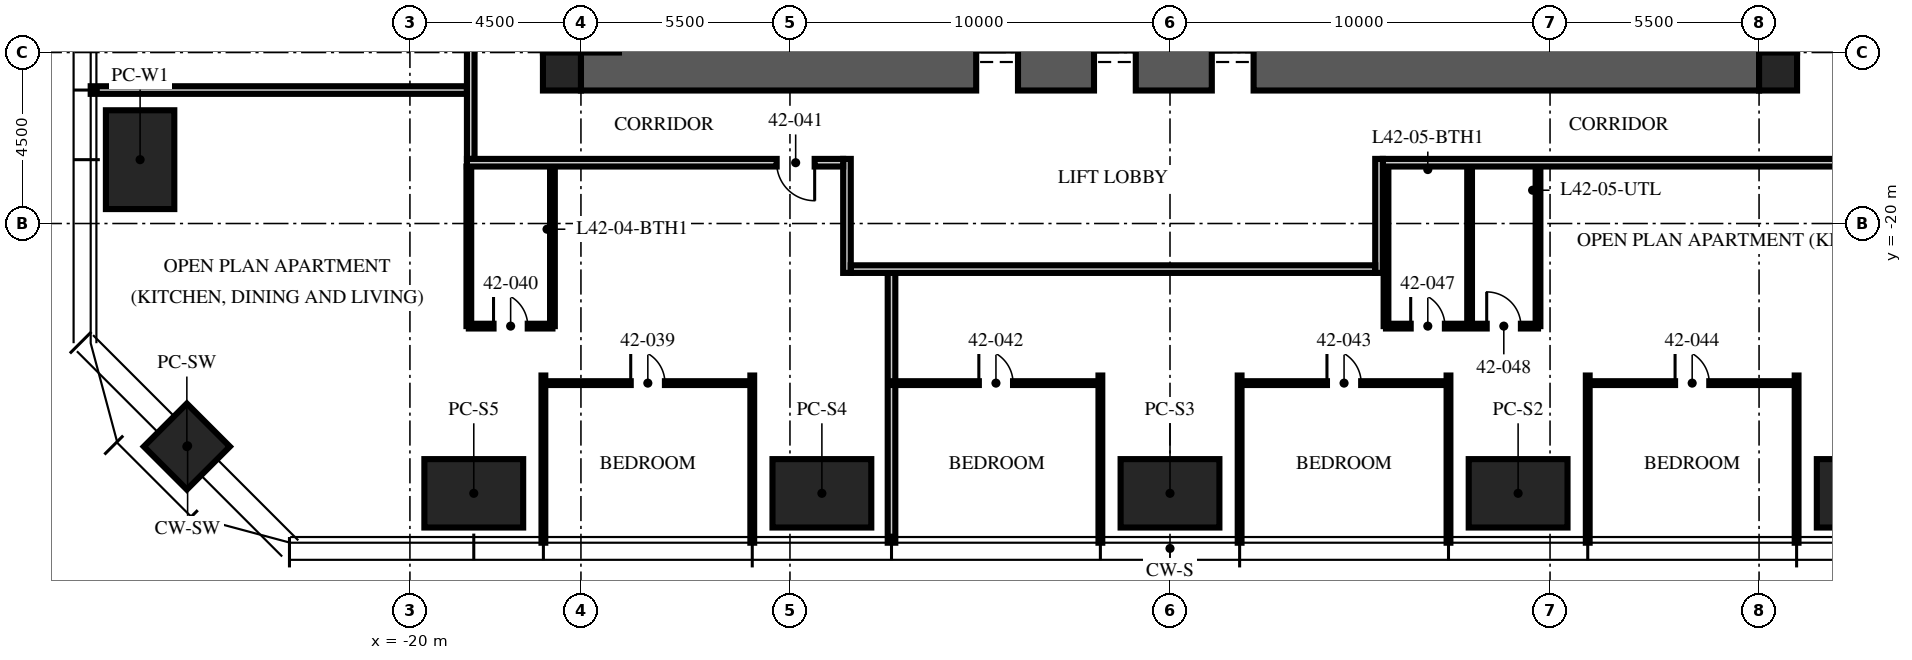
"""IFC4 building model, lengths in metres.
Left out: names, types, materials, properties, quantities, classifications, styles, units other than length and angle.
Written with IfcOpenShell. Run it as: python <this file> out.ifc"""

import sys

from ifc_helpers import new_model, si_unit, direction, frame, frame_2d, origin, origin_2d, place, context, subcontext, project, spatial, rectangle, extrude, element, fill, save


model = new_model("IFC4")
c1 = context("Model", 3, precision=1e-05, world=origin(), true_north=direction((0.0, 1.0)))
c2 = subcontext(c1, "Body", "Model", "MODEL_VIEW")
j1 = project(units=[si_unit("LENGTHUNIT", "METRE"), si_unit("PLANEANGLEUNIT", "RADIAN")], contexts=[c1])
p1 = place(None, origin())
s1 = spatial("IfcSite", under=j1, at=p1, CompositionType="ELEMENT")
p2 = place(p1, origin())
s2 = spatial("IfcBuilding", under=s1, at=p2, CompositionType="ELEMENT")
p3 = place(p2, frame((0.0, 0.0, 167.25)))
s3 = spatial("IfcBuildingStorey", under=s2, at=p3, CompositionType="ELEMENT", Elevation=167.25)
p4 = place(p3, frame((-15.5, -15.5, -0.25), z_axis=(0.0, 0.0, 1.0), x_axis=(1.0, 0.0, 0.0)))
e1 = element("IfcWall", 1, at=p4, inside=s3, PredefinedType="SHEAR", context=c2, shape_type="SweptSolid", body=[
    extrude(rectangle(XDim=31.0, YDim=2.0, at=frame_2d((15.5, 0.0))), origin(), (0.0, 0.0, 1.0), 3.75),
])
p5 = place(p4, frame((10.4, 0.0, 0.25)))
e2 = element("IfcOpeningElement", 2, at=p5, cuts=e1, PredefinedType="OPENING", context=c2, shape_type="SweptSolid", body=[
    extrude(rectangle(XDim=1.1, YDim=2.1, at=frame_2d((0.55, 1.05))), frame((0.0, 1.01, 0.0), z_axis=(0.0, -1.0, 0.0), x_axis=(1.0, 0.0, 0.0)), (0.0, 0.0, 1.0), 2.02),
])
p6 = place(p4, frame((13.5, 0.0, 0.25)))
e3 = element("IfcOpeningElement", 3, at=p6, cuts=e1, PredefinedType="OPENING", context=c2, shape_type="SweptSolid", body=[
    extrude(rectangle(XDim=1.1, YDim=2.1, at=frame_2d((0.55, 1.05))), frame((0.0, 1.01, 0.0), z_axis=(0.0, -1.0, 0.0), x_axis=(1.0, 0.0, 0.0)), (0.0, 0.0, 1.0), 2.02),
])
p7 = place(p4, frame((16.6, 0.0, 0.25)))
e4 = element("IfcOpeningElement", 4, at=p7, cuts=e1, PredefinedType="OPENING", context=c2, shape_type="SweptSolid", body=[
    extrude(rectangle(XDim=1.1, YDim=2.1, at=frame_2d((0.55, 1.05))), frame((0.0, 1.01, 0.0), z_axis=(0.0, -1.0, 0.0), x_axis=(1.0, 0.0, 0.0)), (0.0, 0.0, 1.0), 2.02),
])
for number, where, z_axis, x_axis in (
    (5, (-16.0, -16.0, -0.25), (0.0, 0.0, 1.0), (1.0, 0.0, 0.0)),
    (6, (16.0, -16.0, -0.25), (0.0, 0.0, 1.0), (1.0, 0.0, 0.0)),
):
    element("IfcColumn", number, at=place(p3, frame(where, z_axis=z_axis, x_axis=x_axis)), inside=s3, PredefinedType="COLUMN", context=c2, shape_type="SweptSolid", body=[
        extrude(rectangle(XDim=1.0, YDim=1.0, at=origin_2d()), origin(), (0.0, 0.0, 1.0), 3.75),
    ])
for number, where, z_axis, x_axis in (
    (7, (18.32, -27.1, 0.0), (0.0, 0.0, 1.0), (1.0, 0.0, 0.0)),
    (8, (9.16, -27.1, 0.0), (0.0, 0.0, 1.0), (1.0, 0.0, 0.0)),
    (9, (0.0, -27.1, 0.0), (0.0, 0.0, 1.0), (1.0, 0.0, 0.0)),
    (10, (-9.16, -27.1, 0.0), (0.0, 0.0, 1.0), (1.0, 0.0, 0.0)),
    (11, (-18.32, -27.1, 0.0), (0.0, 0.0, 1.0), (1.0, 0.0, 0.0)),
    (12, (-27.1, -18.32, 0.0), (0.0, 0.0, 1.0), (0.0, 1.0, 0.0)),
):
    element("IfcColumn", number, at=place(p3, frame(where, z_axis=z_axis, x_axis=x_axis)), inside=s3, PredefinedType="COLUMN", context=c2, shape_type="SweptSolid", body=[
        extrude(rectangle(XDim=2.6, YDim=1.8, at=origin_2d()), origin(), (0.0, 0.0, 1.0), 3.75),
    ])
p8 = place(p3, frame((-25.87, -25.87, 0.0), z_axis=(0.0, 0.0, 1.0), x_axis=(0.707106781187, -0.707106781187, 0.0)))
e13 = element("IfcColumn", 13, at=p8, inside=s3, PredefinedType="COLUMN", context=c2, shape_type="SweptSolid", body=[
    extrude(rectangle(XDim=1.6, YDim=1.6, at=origin_2d()), origin(), (0.0, 0.0, 1.0), 3.75),
])
p9 = place(p3, frame((-18.5, -16.488, 0.0), z_axis=(0.0, 0.0, 1.0), x_axis=(-1.0, 0.0, 0.0)))
e14 = element("IfcWall", 14, at=p9, inside=s3, PredefinedType="PARTITIONING", context=c2, shape_type="SweptSolid", body=[
    extrude(rectangle(XDim=9.9, YDim=0.2, at=frame_2d((4.95, 0.0))), origin(), (0.0, 0.0, 1.0), 2.81),
])
for number, where, z_axis, x_axis in (
    (15, (-16.488, -24.0, 0.0), (0.0, 0.0, 1.0), (0.0, -1.0, 0.0)),
    (16, (-10.992, -24.0, 0.0), (0.0, 0.0, 1.0), (0.0, -1.0, 0.0)),
):
    element("IfcWall", number, at=place(p3, frame(where, z_axis=z_axis, x_axis=x_axis)), inside=s3, PredefinedType="PARTITIONING", context=c2, shape_type="SweptSolid", body=[
        extrude(rectangle(XDim=4.4, YDim=0.1, at=frame_2d((2.2, 0.0))), origin(), (0.0, 0.0, 1.0), 2.81),
    ])
p10 = place(p3, frame((-7.328, -21.3, 0.0), z_axis=(0.0, 0.0, 1.0), x_axis=(0.0, -1.0, 0.0)))
e17 = element("IfcWall", 17, at=p10, inside=s3, PredefinedType="PARTITIONING", context=c2, shape_type="SweptSolid", body=[
    extrude(rectangle(XDim=7.1, YDim=0.2, at=frame_2d((3.55, 0.0))), origin(), (0.0, 0.0, 1.0), 2.81),
])
for number, where, z_axis, x_axis in (
    (18, (-1.832, -24.0, 0.0), (0.0, 0.0, 1.0), (0.0, -1.0, 0.0)),
    (19, (1.832, -24.0, 0.0), (0.0, 0.0, 1.0), (0.0, -1.0, 0.0)),
    (20, (7.328, -24.0, 0.0), (0.0, 0.0, 1.0), (0.0, -1.0, 0.0)),
    (21, (10.992, -24.0, 0.0), (0.0, 0.0, 1.0), (0.0, -1.0, 0.0)),
    (22, (16.488, -24.0, 0.0), (0.0, 0.0, 1.0), (0.0, -1.0, 0.0)),
):
    element("IfcWall", number, at=place(p3, frame(where, z_axis=z_axis, x_axis=x_axis)), inside=s3, PredefinedType="PARTITIONING", context=c2, shape_type="SweptSolid", body=[
        extrude(rectangle(XDim=4.4, YDim=0.1, at=frame_2d((2.2, 0.0))), origin(), (0.0, 0.0, 1.0), 2.81),
    ])
p11 = place(p3, frame((-16.488, -24.2, 0.0), z_axis=(0.0, 0.0, 1.0), x_axis=(1.0, 0.0, 0.0)))
e23 = element("IfcWall", 23, at=p11, inside=s3, PredefinedType="PARTITIONING", context=c2, shape_type="SweptSolid", body=[
    extrude(rectangle(XDim=5.496, YDim=0.1, at=frame_2d((2.748, 0.0))), origin(), (0.0, 0.0, 1.0), 2.81),
])
p12 = place(p11, frame((2.298, 0.0, 0.0)))
e24 = element("IfcOpeningElement", 24, at=p12, cuts=e23, PredefinedType="OPENING", context=c2, shape_type="SweptSolid", body=[
    extrude(rectangle(XDim=0.9, YDim=2.1, at=frame_2d((0.45, 1.05))), frame((0.0, 0.06, 0.0), z_axis=(0.0, -1.0, 0.0), x_axis=(1.0, 0.0, 0.0)), (0.0, 0.0, 1.0), 0.12),
])
p13 = place(p3, frame((-18.45, -22.7, 0.0), z_axis=(0.0, 0.0, 1.0), x_axis=(1.0, 0.0, 0.0)))
e25 = element("IfcWall", 25, at=p13, inside=s3, PredefinedType="PARTITIONING", context=c2, shape_type="SweptSolid", body=[
    extrude(rectangle(XDim=2.2, YDim=0.125, at=frame_2d((1.1, 0.0))), origin(), (0.0, 0.0, 1.0), 2.7),
])
p14 = place(p13, frame((0.65, 0.0, 0.0)))
e26 = element("IfcOpeningElement", 26, at=p14, cuts=e25, PredefinedType="OPENING", context=c2, shape_type="SweptSolid", body=[
    extrude(rectangle(XDim=0.9, YDim=2.1, at=frame_2d((0.45, 1.05))), frame((0.0, 0.073, 0.0), z_axis=(0.0, -1.0, 0.0), x_axis=(1.0, 0.0, 0.0)), (0.0, 0.0, 1.0), 0.145),
])
p15 = place(p3, frame((-18.45, -18.5, 0.0), z_axis=(0.0, 0.0, 1.0), x_axis=(0.0, -1.0, 0.0)))
e27 = element("IfcWall", 27, at=p15, inside=s3, PredefinedType="PARTITIONING", context=c2, shape_type="SweptSolid", body=[
    extrude(rectangle(XDim=4.2, YDim=0.125, at=frame_2d((2.1, 0.0))), origin(), (0.0, 0.0, 1.0), 2.3),
])
p16 = place(p3, frame((-16.25, -18.5, 0.0), z_axis=(0.0, 0.0, 1.0), x_axis=(0.0, -1.0, 0.0)))
e28 = element("IfcWall", 28, at=p16, inside=s3, PredefinedType="PARTITIONING", context=c2, shape_type="SweptSolid", body=[
    extrude(rectangle(XDim=4.2, YDim=0.125, at=frame_2d((2.1, 0.0))), origin(), (0.0, 0.0, 1.0), 3.5),
])
p17 = place(p3, frame((-7.328, -24.2, 0.0), z_axis=(0.0, 0.0, 1.0), x_axis=(1.0, 0.0, 0.0)))
e29 = element("IfcWall", 29, at=p17, inside=s3, PredefinedType="PARTITIONING", context=c2, shape_type="SweptSolid", body=[
    extrude(rectangle(XDim=5.496, YDim=0.1, at=frame_2d((2.748, 0.0))), origin(), (0.0, 0.0, 1.0), 2.81),
])
p18 = place(p17, frame((2.298, 0.0, 0.0)))
e30 = element("IfcOpeningElement", 30, at=p18, cuts=e29, PredefinedType="OPENING", context=c2, shape_type="SweptSolid", body=[
    extrude(rectangle(XDim=0.9, YDim=2.1, at=frame_2d((0.45, 1.05))), frame((0.0, 0.06, 0.0), z_axis=(0.0, -1.0, 0.0), x_axis=(1.0, 0.0, 0.0)), (0.0, 0.0, 1.0), 0.12),
])
p19 = place(p3, frame((1.832, -24.2, 0.0), z_axis=(0.0, 0.0, 1.0), x_axis=(1.0, 0.0, 0.0)))
e31 = element("IfcWall", 31, at=p19, inside=s3, PredefinedType="PARTITIONING", context=c2, shape_type="SweptSolid", body=[
    extrude(rectangle(XDim=5.496, YDim=0.1, at=frame_2d((2.748, 0.0))), origin(), (0.0, 0.0, 1.0), 2.81),
])
p20 = place(p19, frame((2.298, 0.0, 0.0)))
e32 = element("IfcOpeningElement", 32, at=p20, cuts=e31, PredefinedType="OPENING", context=c2, shape_type="SweptSolid", body=[
    extrude(rectangle(XDim=0.9, YDim=2.1, at=frame_2d((0.45, 1.05))), frame((0.0, 0.06, 0.0), z_axis=(0.0, -1.0, 0.0), x_axis=(1.0, 0.0, 0.0)), (0.0, 0.0, 1.0), 0.12),
])
p21 = place(p3, frame((10.992, -24.2, 0.0), z_axis=(0.0, 0.0, 1.0), x_axis=(1.0, 0.0, 0.0)))
e33 = element("IfcWall", 33, at=p21, inside=s3, PredefinedType="PARTITIONING", context=c2, shape_type="SweptSolid", body=[
    extrude(rectangle(XDim=5.496, YDim=0.1, at=frame_2d((2.748, 0.0))), origin(), (0.0, 0.0, 1.0), 2.81),
])
p22 = place(p21, frame((2.298, 0.0, 0.0)))
e34 = element("IfcOpeningElement", 34, at=p22, cuts=e33, PredefinedType="OPENING", context=c2, shape_type="SweptSolid", body=[
    extrude(rectangle(XDim=0.9, YDim=2.1, at=frame_2d((0.45, 1.05))), frame((0.0, 0.06, 0.0), z_axis=(0.0, -1.0, 0.0), x_axis=(1.0, 0.0, 0.0)), (0.0, 0.0, 1.0), 0.12),
])
p23 = place(p3, frame((5.684, -22.7, 0.0), z_axis=(0.0, 0.0, 1.0), x_axis=(1.0, 0.0, 0.0)))
e35 = element("IfcWall", 35, at=p23, inside=s3, PredefinedType="PARTITIONING", context=c2, shape_type="SweptSolid", body=[
    extrude(rectangle(XDim=4.0, YDim=0.125, at=frame_2d((2.0, 0.0))), origin(), (0.0, 0.0, 1.0), 2.7),
])
p24 = place(p23, frame((0.65, 0.0, 0.0)))
e36 = element("IfcOpeningElement", 36, at=p24, cuts=e35, PredefinedType="OPENING", context=c2, shape_type="SweptSolid", body=[
    extrude(rectangle(XDim=0.9, YDim=2.1, at=frame_2d((0.45, 1.05))), frame((0.0, 0.073, 0.0), z_axis=(0.0, -1.0, 0.0), x_axis=(1.0, 0.0, 0.0)), (0.0, 0.0, 1.0), 0.145),
])
p25 = place(p23, frame((2.65, 0.0, 0.0)))
e37 = element("IfcOpeningElement", 37, at=p25, cuts=e35, PredefinedType="OPENING", context=c2, shape_type="SweptSolid", body=[
    extrude(rectangle(XDim=0.9, YDim=2.1, at=frame_2d((0.45, 1.05))), frame((0.0, 0.073, 0.0), z_axis=(0.0, -1.0, 0.0), x_axis=(1.0, 0.0, 0.0)), (0.0, 0.0, 1.0), 0.145),
])
for number, where, z_axis, x_axis in (
    (38, (5.684, -18.5, 0.0), (0.0, 0.0, 1.0), (0.0, -1.0, 0.0)),
    (39, (7.884, -18.5, 0.0), (0.0, 0.0, 1.0), (0.0, -1.0, 0.0)),
    (40, (9.684, -18.5, 0.0), (0.0, 0.0, 1.0), (0.0, -1.0, 0.0)),
):
    element("IfcWall", number, at=place(p3, frame(where, z_axis=z_axis, x_axis=x_axis)), inside=s3, PredefinedType="PARTITIONING", context=c2, shape_type="SweptSolid", body=[
        extrude(rectangle(XDim=4.2, YDim=0.125, at=frame_2d((2.1, 0.0))), origin(), (0.0, 0.0, 1.0), 3.5),
    ])
p26 = place(p3, frame((-18.4, 5.328, 0.0), z_axis=(0.0, 0.0, 1.0), x_axis=(0.0, -1.0, 0.0)))
e41 = element("IfcWall", 41, at=p26, inside=s3, PredefinedType="PARTITIONING", context=c2, shape_type="SweptSolid", body=[
    extrude(rectangle(XDim=23.628, YDim=0.2, at=frame_2d((11.814, 0.0))), origin(), (0.0, 0.0, 1.0), 2.3),
])
p27 = place(p3, frame((18.5, -18.4, 0.0), z_axis=(0.0, 0.0, 1.0), x_axis=(-1.0, 0.0, 0.0)))
e42 = element("IfcWall", 42, at=p27, inside=s3, PredefinedType="PARTITIONING", context=c2, shape_type="SweptSolid", body=[
    extrude(rectangle(XDim=12.9, YDim=0.2, at=frame_2d((6.45, 0.0))), origin(), (0.0, 0.0, 1.0), 2.3),
])
for number, where, z_axis, x_axis in (
    (43, (5.5, -18.3, 0.0), (0.0, 0.0, 1.0), (0.0, -1.0, 0.0)),
    (44, (-8.5, -18.3, 0.0), (0.0, 0.0, 1.0), (0.0, -1.0, 0.0)),
):
    element("IfcWall", number, at=place(p3, frame(where, z_axis=z_axis, x_axis=x_axis)), inside=s3, PredefinedType="PARTITIONING", context=c2, shape_type="SweptSolid", body=[
        extrude(rectangle(XDim=3.0, YDim=0.2, at=frame_2d((1.5, 0.0))), origin(), (0.0, 0.0, 1.0), 3.5),
    ])
p28 = place(p3, frame((5.4, -21.2, 0.0), z_axis=(0.0, 0.0, 1.0), x_axis=(-1.0, 0.0, 0.0)))
e45 = element("IfcWall", 45, at=p28, inside=s3, PredefinedType="PARTITIONING", context=c2, shape_type="SweptSolid", body=[
    extrude(rectangle(XDim=13.8, YDim=0.2, at=frame_2d((6.9, 0.0))), origin(), (0.0, 0.0, 1.0), 2.7),
])
p29 = place(p3, frame((-8.6, -18.4, 0.0), z_axis=(0.0, 0.0, 1.0), x_axis=(-1.0, 0.0, 0.0)))
e46 = element("IfcWall", 46, at=p29, inside=s3, PredefinedType="PARTITIONING", context=c2, shape_type="SweptSolid", body=[
    extrude(rectangle(XDim=9.9, YDim=0.2, at=frame_2d((4.95, 0.0))), origin(), (0.0, 0.0, 1.0), 2.3),
])
p30 = place(p29, frame((0.75, 0.0, 0.0)))
e47 = element("IfcOpeningElement", 47, at=p30, cuts=e46, PredefinedType="OPENING", context=c2, shape_type="SweptSolid", body=[
    extrude(rectangle(XDim=1.0, YDim=2.2, at=frame_2d((0.5, 1.1))), frame((0.0, 0.11, 0.0), z_axis=(0.0, -1.0, 0.0), x_axis=(1.0, 0.0, 0.0)), (0.0, 0.0, 1.0), 0.22),
])
p31 = place(p5, origin())
e48 = element("IfcDoor", 48, at=p31, inside=s3, OperationType="DOUBLE_DOOR_SLIDING", PredefinedType="DOOR", context=c2, shape_type="SweptSolid", body=[
    extrude(rectangle(XDim=1.1, YDim=2.1, at=frame_2d((0.55, 1.05))), frame((0.0, 0.025, 0.0), z_axis=(0.0, -1.0, 0.0), x_axis=(1.0, 0.0, 0.0)), (0.0, 0.0, 1.0), 0.05),
])
fill(e2, e48)
p32 = place(p6, origin())
e49 = element("IfcDoor", 49, at=p32, inside=s3, OperationType="DOUBLE_DOOR_SLIDING", PredefinedType="DOOR", context=c2, shape_type="SweptSolid", body=[
    extrude(rectangle(XDim=1.1, YDim=2.1, at=frame_2d((0.55, 1.05))), frame((0.0, 0.025, 0.0), z_axis=(0.0, -1.0, 0.0), x_axis=(1.0, 0.0, 0.0)), (0.0, 0.0, 1.0), 0.05),
])
fill(e3, e49)
p33 = place(p7, origin())
e50 = element("IfcDoor", 50, at=p33, inside=s3, OperationType="DOUBLE_DOOR_SLIDING", PredefinedType="DOOR", context=c2, shape_type="SweptSolid", body=[
    extrude(rectangle(XDim=1.1, YDim=2.1, at=frame_2d((0.55, 1.05))), frame((0.0, 0.025, 0.0), z_axis=(0.0, -1.0, 0.0), x_axis=(1.0, 0.0, 0.0)), (0.0, 0.0, 1.0), 0.05),
])
fill(e4, e50)
p34 = place(p12, origin())
e51 = element("IfcDoor", 51, at=p34, inside=s3, OperationType="SINGLE_SWING_LEFT", PredefinedType="DOOR", context=c2, shape_type="SweptSolid", body=[
    extrude(rectangle(XDim=0.9, YDim=2.1, at=frame_2d((0.45, 1.05))), frame((0.0, 0.025, 0.0), z_axis=(0.0, -1.0, 0.0), x_axis=(1.0, 0.0, 0.0)), (0.0, 0.0, 1.0), 0.05),
])
fill(e24, e51)
p35 = place(p14, origin())
e52 = element("IfcDoor", 52, at=p35, inside=s3, OperationType="SINGLE_SWING_LEFT", PredefinedType="DOOR", context=c2, shape_type="SweptSolid", body=[
    extrude(rectangle(XDim=0.9, YDim=2.1, at=frame_2d((0.45, 1.05))), frame((0.0, 0.025, 0.0), z_axis=(0.0, -1.0, 0.0), x_axis=(1.0, 0.0, 0.0)), (0.0, 0.0, 1.0), 0.05),
])
fill(e26, e52)
p36 = place(p30, origin())
e53 = element("IfcDoor", 53, at=p36, inside=s3, OperationType="SINGLE_SWING_LEFT", PredefinedType="DOOR", context=c2, shape_type="SweptSolid", body=[
    extrude(rectangle(XDim=1.0, YDim=2.2, at=frame_2d((0.5, 1.1))), frame((0.0, 0.025, 0.0), z_axis=(0.0, -1.0, 0.0), x_axis=(1.0, 0.0, 0.0)), (0.0, 0.0, 1.0), 0.05),
])
fill(e47, e53)
p37 = place(p18, origin())
e54 = element("IfcDoor", 54, at=p37, inside=s3, OperationType="SINGLE_SWING_LEFT", PredefinedType="DOOR", context=c2, shape_type="SweptSolid", body=[
    extrude(rectangle(XDim=0.9, YDim=2.1, at=frame_2d((0.45, 1.05))), frame((0.0, 0.025, 0.0), z_axis=(0.0, -1.0, 0.0), x_axis=(1.0, 0.0, 0.0)), (0.0, 0.0, 1.0), 0.05),
])
fill(e30, e54)
p38 = place(p20, origin())
e55 = element("IfcDoor", 55, at=p38, inside=s3, OperationType="SINGLE_SWING_LEFT", PredefinedType="DOOR", context=c2, shape_type="SweptSolid", body=[
    extrude(rectangle(XDim=0.9, YDim=2.1, at=frame_2d((0.45, 1.05))), frame((0.0, 0.025, 0.0), z_axis=(0.0, -1.0, 0.0), x_axis=(1.0, 0.0, 0.0)), (0.0, 0.0, 1.0), 0.05),
])
fill(e32, e55)
p39 = place(p22, origin())
e56 = element("IfcDoor", 56, at=p39, inside=s3, OperationType="SINGLE_SWING_LEFT", PredefinedType="DOOR", context=c2, shape_type="SweptSolid", body=[
    extrude(rectangle(XDim=0.9, YDim=2.1, at=frame_2d((0.45, 1.05))), frame((0.0, 0.025, 0.0), z_axis=(0.0, -1.0, 0.0), x_axis=(1.0, 0.0, 0.0)), (0.0, 0.0, 1.0), 0.05),
])
fill(e34, e56)
p40 = place(p24, origin())
e57 = element("IfcDoor", 57, at=p40, inside=s3, OperationType="SINGLE_SWING_LEFT", PredefinedType="DOOR", context=c2, shape_type="SweptSolid", body=[
    extrude(rectangle(XDim=0.9, YDim=2.1, at=frame_2d((0.45, 1.05))), frame((0.0, 0.025, 0.0), z_axis=(0.0, -1.0, 0.0), x_axis=(1.0, 0.0, 0.0)), (0.0, 0.0, 1.0), 0.05),
])
fill(e36, e57)
p41 = place(p25, origin())
e58 = element("IfcDoor", 58, at=p41, inside=s3, OperationType="SINGLE_SWING_LEFT", PredefinedType="DOOR", context=c2, shape_type="SweptSolid", body=[
    extrude(rectangle(XDim=0.9, YDim=2.1, at=frame_2d((0.45, 1.05))), frame((0.0, 0.025, 0.0), z_axis=(0.0, -1.0, 0.0), x_axis=(1.0, 0.0, 0.0)), (0.0, 0.0, 1.0), 0.05),
])
fill(e37, e58)
save(model, sys.argv[1])
